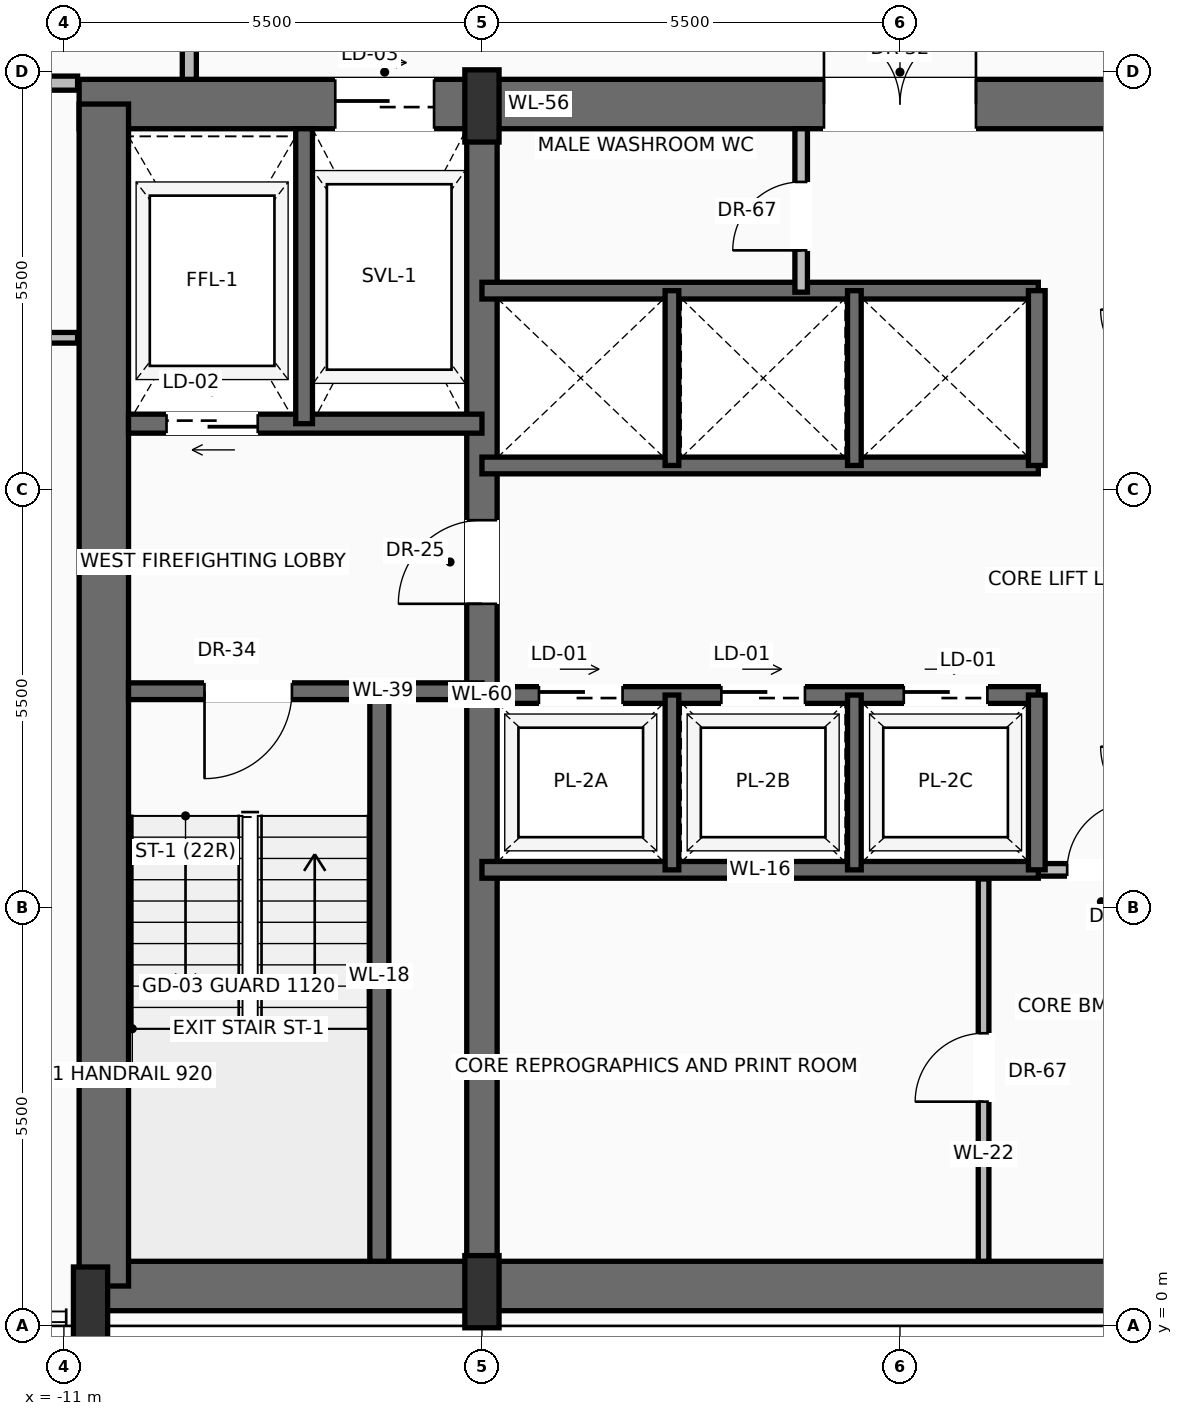
"""IFC4 building model, lengths in metres.
Left out: names, types, materials, properties, quantities, classifications, styles, units other than length and angle.
Written with IfcOpenShell. Run it as: python <this file> out.ifc"""

import sys

from ifc_helpers import new_model, si_unit, direction, frame, frame_2d, origin, origin_2d, place, context, subcontext, project, spatial, rectangle, extrude, source, transform, mapped, element, fill, save


model = new_model("IFC4")
c1 = context("Model", 3, precision=1e-05, world=origin(), true_north=direction((0.0, 1.0)))
c2 = subcontext(c1, "Body", "Model", "MODEL_VIEW")
j1 = project(units=[si_unit("LENGTHUNIT", "METRE"), si_unit("PLANEANGLEUNIT", "RADIAN")], contexts=[c1])
p1 = place(None, origin())
s1 = spatial("IfcSite", under=j1, at=p1, CompositionType="ELEMENT")
p2 = place(p1, origin())
s2 = spatial("IfcBuilding", under=s1, at=p2, CompositionType="ELEMENT")
p3 = place(p2, frame((0.0, 0.0, 162.6)))
s3 = spatial("IfcBuildingStorey", under=s2, at=p3, CompositionType="ELEMENT", Elevation=162.6)
p4 = place(p3, frame((-10.65, 0.525, 0.0), z_axis=(0.0, 0.0, 1.0), x_axis=(1.0, 0.0, 0.0)))
e1 = element("IfcWall", 1, at=p4, inside=s3, PredefinedType="SHEAR", context=c2, shape_type="SweptSolid", body=[
    extrude(rectangle(XDim=21.3, YDim=0.65, at=frame_2d((10.65, 0.0))), origin(), (0.0, 0.0, 1.0), 3.4),
])
p5 = place(p3, frame((-10.8, 16.075, 0.0), z_axis=(0.0, 0.0, 1.0), x_axis=(1.0, 0.0, 0.0)))
e2 = element("IfcWall", 2, at=p5, inside=s3, PredefinedType="SHEAR", context=c2, shape_type="SweptSolid", body=[
    extrude(rectangle(XDim=21.6, YDim=0.65, at=frame_2d((10.8, 0.0))), origin(), (0.0, 0.0, 1.0), 3.4),
])
p6 = place(p5, frame((3.37, 0.0, 0.0)))
e3 = element("IfcOpeningElement", 3, at=p6, cuts=e2, PredefinedType="OPENING", context=c2, shape_type="SweptSolid", body=[
    extrude(rectangle(XDim=1.3, YDim=2.3, at=frame_2d((0.65, 1.15))), frame((0.0, 0.335, 0.0), z_axis=(0.0, -1.0, 0.0), x_axis=(1.0, 0.0, 0.0)), (0.0, 0.0, 1.0), 0.67),
])
p7 = place(p5, frame((9.8, 0.0, 0.0)))
e4 = element("IfcOpeningElement", 4, at=p7, cuts=e2, PredefinedType="OPENING", context=c2, shape_type="SweptSolid", body=[
    extrude(rectangle(XDim=2.0, YDim=2.4, at=frame_2d((1.0, 1.2))), frame((0.0, 0.335, 0.0), z_axis=(0.0, -1.0, 0.0), x_axis=(1.0, 0.0, 0.0)), (0.0, 0.0, 1.0), 0.67),
])
p8 = place(p3, frame((-10.475, 0.525, 0.0), z_axis=(0.0, 0.0, 1.0), x_axis=(0.0, 1.0, 0.0)))
e5 = element("IfcWall", 5, at=p8, inside=s3, PredefinedType="SHEAR", context=c2, shape_type="SweptSolid", body=[
    extrude(rectangle(XDim=15.55, YDim=0.65, at=frame_2d((7.775, 0.0))), origin(), (0.0, 0.0, 1.0), 3.4),
])
p9 = place(p3, frame((-5.5, 0.525, 0.0), z_axis=(0.0, 0.0, 1.0), x_axis=(0.0, 1.0, 0.0)))
e6 = element("IfcWall", 6, at=p9, inside=s3, PredefinedType="SHEAR", context=c2, shape_type="SweptSolid", body=[
    extrude(rectangle(XDim=15.55, YDim=0.4, at=frame_2d((7.775, 0.0))), origin(), (0.0, 0.0, 1.0), 3.4),
])
p10 = place(p9, frame((8.975, 0.0, 0.0)))
e7 = element("IfcOpeningElement", 7, at=p10, cuts=e6, PredefinedType="OPENING", context=c2, shape_type="SweptSolid", body=[
    extrude(rectangle(XDim=1.1, YDim=2.2, at=frame_2d((0.55, 1.1))), frame((0.0, 0.21, 0.0), z_axis=(0.0, -1.0, 0.0), x_axis=(1.0, 0.0, 0.0)), (0.0, 0.0, 1.0), 0.42),
])
m1 = source(origin(), c2, "Body", "SweptSolid", [
    extrude(rectangle(XDim=0.45, YDim=0.95, at=origin_2d()), origin(), (0.0, 0.0, 1.0), 3.7),
])
for number, where, z_axis, x_axis in (
    (8, (-10.65, 0.3, 0.0), (0.0, 0.0, 1.0), (1.0, 0.0, 0.0)),
    (9, (-5.5, 0.45, 0.0), (0.0, 0.0, 1.0), (1.0, 0.0, 0.0)),
    (10, (-5.5, 16.05, 0.0), (0.0, 0.0, 1.0), (1.0, 0.0, 0.0)),
):
    element("IfcColumn", number, at=place(p3, frame(where, z_axis=z_axis, x_axis=x_axis)), inside=s3, PredefinedType="PILASTER", context=c2, shape_type="MappedRepresentation", body=[
        mapped(m1, transform((0.0, 0.0, 0.0), scale=1.0)),
    ])
p11 = place(p3, frame((-20.672, 16.765, 0.0), z_axis=(0.0, 0.0, 1.0), x_axis=(0.53680257422, 0.843707885651, 0.0)))
e11 = element("IfcWall", 11, at=p11, inside=s3, PredefinedType="SOLIDWALL", context=c2, shape_type="SweptSolid", body=[
    extrude(rectangle(XDim=18.632, YDim=0.28, at=frame_2d((9.316, 0.0))), origin(), (0.0, 0.0, 1.0), 2.98),
])
p12 = place(p11, frame((4.472, 0.0, 0.0)))
e12 = element("IfcOpeningElement", 12, at=p12, cuts=e11, PredefinedType="OPENING", context=c2, shape_type="SweptSolid", body=[
    extrude(rectangle(XDim=1.6, YDim=2.35, at=frame_2d((0.8, 1.175))), frame((0.0, 0.15, 0.0), z_axis=(0.0, -1.0, 0.0), x_axis=(1.0, 0.0, 0.0)), (0.0, 0.0, 1.0), 0.3),
])
p13 = place(p11, frame((12.67, 0.0, 0.9)))
e13 = element("IfcOpeningElement", 13, at=p13, cuts=e11, PredefinedType="OPENING", context=c2, shape_type="SweptSolid", body=[
    extrude(rectangle(XDim=1.55, YDim=1.85, at=frame_2d((0.775, 0.925))), frame((0.0, 0.15, 0.0), z_axis=(0.0, -1.0, 0.0), x_axis=(1.0, 0.0, 0.0)), (0.0, 0.0, 1.0), 0.3),
])
p14 = place(p3, frame((-6.85, 0.85, 0.0), z_axis=(0.0, 0.0, 1.0), x_axis=(0.0, 1.0, 0.0)))
e14 = element("IfcWall", 14, at=p14, inside=s3, PredefinedType="SOLIDWALL", context=c2, shape_type="SweptSolid", body=[
    extrude(rectangle(XDim=7.5, YDim=0.25, at=frame_2d((3.75, 0.0))), origin(), (0.0, 0.0, 1.0), 3.4),
])
p15 = place(p3, frame((-5.5, 8.35, 0.0), z_axis=(0.0, 0.0, 1.0), x_axis=(-1.0, 0.0, 0.0)))
e15 = element("IfcWall", 15, at=p15, inside=s3, PredefinedType="SOLIDWALL", context=c2, shape_type="SweptSolid", body=[
    extrude(rectangle(XDim=4.65, YDim=0.22, at=frame_2d((2.325, 0.0))), origin(), (0.0, 0.0, 1.0), 3.4),
])
p16 = place(p15, frame((2.5, 0.0, 0.0)))
e16 = element("IfcOpeningElement", 16, at=p16, cuts=e15, PredefinedType="OPENING", context=c2, shape_type="SweptSolid", body=[
    extrude(rectangle(XDim=1.15, YDim=2.2, at=frame_2d((0.575, 1.1))), frame((0.0, 0.12, 0.0), z_axis=(0.0, -1.0, 0.0), x_axis=(1.0, 0.0, 0.0)), (0.0, 0.0, 1.0), 0.24),
])
p17 = place(p3, frame((-5.5, 11.87, 0.0), z_axis=(0.0, 0.0, 1.0), x_axis=(-1.0, 0.0, 0.0)))
e17 = element("IfcWall", 17, at=p17, inside=s3, PredefinedType="SOLIDWALL", context=c2, shape_type="SweptSolid", body=[
    extrude(rectangle(XDim=4.65, YDim=0.25, at=frame_2d((2.325, 0.0))), origin(), (0.0, 0.0, 1.0), 3.4),
])
p18 = place(p17, frame((2.95, 0.0, 0.0)))
e18 = element("IfcOpeningElement", 18, at=p18, cuts=e17, PredefinedType="OPENING", context=c2, shape_type="SweptSolid", body=[
    extrude(rectangle(XDim=1.2, YDim=2.25, at=frame_2d((0.6, 1.125))), frame((0.0, 0.135, 0.0), z_axis=(0.0, -1.0, 0.0), x_axis=(1.0, 0.0, 0.0)), (0.0, 0.0, 1.0), 0.27),
])
p19 = place(p3, frame((-7.84, 11.87, 0.0), z_axis=(0.0, 0.0, 1.0), x_axis=(0.0, 1.0, 0.0)))
e19 = element("IfcWall", 19, at=p19, inside=s3, PredefinedType="SOLIDWALL", context=c2, shape_type="SweptSolid", body=[
    extrude(rectangle(XDim=3.88, YDim=0.22, at=frame_2d((1.94, 0.0))), origin(), (0.0, 0.0, 1.0), 3.4),
])
p20 = place(p3, frame((1.82, 6.0, 0.0), z_axis=(0.0, 0.0, 1.0), x_axis=(1.0, 0.0, 0.0)))
e20 = element("IfcWall", 20, at=p20, inside=s3, PredefinedType="PARTITIONING", context=c2, shape_type="SweptSolid", body=[
    extrude(rectangle(XDim=3.48, YDim=0.165, at=frame_2d((1.74, 0.0))), origin(), (0.0, 0.0, 1.0), 3.392),
])
p21 = place(p20, frame((0.38, 0.0, 0.0)))
e21 = element("IfcOpeningElement", 21, at=p21, cuts=e20, PredefinedType="OPENING", context=c2, shape_type="SweptSolid", body=[
    extrude(rectangle(XDim=0.9, YDim=2.1, at=frame_2d((0.45, 1.05))), frame((0.0, 0.093, 0.0), z_axis=(0.0, -1.0, 0.0), x_axis=(1.0, 0.0, 0.0)), (0.0, 0.0, 1.0), 0.185),
])
p22 = place(p3, frame((1.1, 0.85, 0.0), z_axis=(0.0, 0.0, 1.0), x_axis=(0.0, 1.0, 0.0)))
e22 = element("IfcWall", 22, at=p22, inside=s3, PredefinedType="PARTITIONING", context=c2, shape_type="SweptSolid", body=[
    extrude(rectangle(XDim=5.03, YDim=0.14, at=frame_2d((2.515, 0.0))), origin(), (0.0, 0.0, 1.0), 3.392),
])
p23 = place(p22, frame((2.1, 0.0, 0.0)))
e23 = element("IfcOpeningElement", 23, at=p23, cuts=e22, PredefinedType="OPENING", context=c2, shape_type="SweptSolid", body=[
    extrude(rectangle(XDim=0.9, YDim=2.1, at=frame_2d((0.45, 1.05))), frame((0.0, 0.08, 0.0), z_axis=(0.0, -1.0, 0.0), x_axis=(1.0, 0.0, 0.0)), (0.0, 0.0, 1.0), 0.16),
])
p24 = place(p3, frame((-5.5, 6.0, 0.0), z_axis=(0.0, 0.0, 1.0), x_axis=(1.0, 0.0, 0.0)))
e24 = element("IfcWall", 24, at=p24, inside=s3, PredefinedType="SOLIDWALL", context=c2, shape_type="SweptSolid", body=[
    extrude(rectangle(XDim=7.32, YDim=0.22, at=frame_2d((3.66, 0.0))), origin(), (0.0, 0.0, 1.0), 3.4),
])
p25 = place(p3, frame((-5.5, 8.3, 0.0), z_axis=(0.0, 0.0, 1.0), x_axis=(1.0, 0.0, 0.0)))
e25 = element("IfcWall", 25, at=p25, inside=s3, PredefinedType="SOLIDWALL", context=c2, shape_type="SweptSolid", body=[
    extrude(rectangle(XDim=7.32, YDim=0.22, at=frame_2d((3.66, 0.0))), origin(), (0.0, 0.0, 1.0), 3.4),
])
p26 = place(p25, frame((0.75, 0.0, 0.0)))
e26 = element("IfcOpeningElement", 26, at=p26, cuts=e25, PredefinedType="OPENING", context=c2, shape_type="SweptSolid", body=[
    extrude(rectangle(XDim=1.1, YDim=2.2, at=frame_2d((0.55, 1.1))), frame((0.0, 0.12, 0.0), z_axis=(0.0, -1.0, 0.0), x_axis=(1.0, 0.0, 0.0)), (0.0, 0.0, 1.0), 0.24),
])
p27 = place(p25, frame((3.15, 0.0, 0.0)))
e27 = element("IfcOpeningElement", 27, at=p27, cuts=e25, PredefinedType="OPENING", context=c2, shape_type="SweptSolid", body=[
    extrude(rectangle(XDim=1.1, YDim=2.2, at=frame_2d((0.55, 1.1))), frame((0.0, 0.12, 0.0), z_axis=(0.0, -1.0, 0.0), x_axis=(1.0, 0.0, 0.0)), (0.0, 0.0, 1.0), 0.24),
])
p28 = place(p25, frame((5.55, 0.0, 0.0)))
e28 = element("IfcOpeningElement", 28, at=p28, cuts=e25, PredefinedType="OPENING", context=c2, shape_type="SweptSolid", body=[
    extrude(rectangle(XDim=1.1, YDim=2.2, at=frame_2d((0.55, 1.1))), frame((0.0, 0.12, 0.0), z_axis=(0.0, -1.0, 0.0), x_axis=(1.0, 0.0, 0.0)), (0.0, 0.0, 1.0), 0.24),
])
p29 = place(p3, frame((1.8, 6.0, 0.0), z_axis=(0.0, 0.0, 1.0), x_axis=(0.0, 1.0, 0.0)))
e29 = element("IfcWall", 29, at=p29, inside=s3, PredefinedType="SOLIDWALL", context=c2, shape_type="SweptSolid", body=[
    extrude(rectangle(XDim=2.3, YDim=0.22, at=frame_2d((1.15, 0.0))), origin(), (0.0, 0.0, 1.0), 3.4),
])
for number, where, z_axis, x_axis in (
    (30, (-3.0, 6.0, 0.0), (0.0, 0.0, 1.0), (0.0, 1.0, 0.0)),
    (31, (-0.6, 6.0, 0.0), (0.0, 0.0, 1.0), (0.0, 1.0, 0.0)),
):
    element("IfcWall", number, at=place(p3, frame(where, z_axis=z_axis, x_axis=x_axis)), inside=s3, PredefinedType="SOLIDWALL", context=c2, shape_type="SweptSolid", body=[
        extrude(rectangle(XDim=2.3, YDim=0.18, at=frame_2d((1.15, 0.0))), origin(), (0.0, 0.0, 1.0), 3.4),
    ])
for number, where, z_axis, x_axis in (
    (32, (-5.5, 11.32, 0.0), (0.0, 0.0, 1.0), (1.0, 0.0, 0.0)),
    (33, (-5.5, 13.62, 0.0), (0.0, 0.0, 1.0), (1.0, 0.0, 0.0)),
):
    element("IfcWall", number, at=place(p3, frame(where, z_axis=z_axis, x_axis=x_axis)), inside=s3, PredefinedType="SOLIDWALL", context=c2, shape_type="SweptSolid", body=[
        extrude(rectangle(XDim=7.32, YDim=0.22, at=frame_2d((3.66, 0.0))), origin(), (0.0, 0.0, 1.0), 3.4),
    ])
p30 = place(p3, frame((1.8, 11.32, 0.0), z_axis=(0.0, 0.0, 1.0), x_axis=(0.0, 1.0, 0.0)))
e34 = element("IfcWall", 34, at=p30, inside=s3, PredefinedType="SOLIDWALL", context=c2, shape_type="SweptSolid", body=[
    extrude(rectangle(XDim=2.3, YDim=0.22, at=frame_2d((1.15, 0.0))), origin(), (0.0, 0.0, 1.0), 3.4),
])
for number, where, z_axis, x_axis in (
    (35, (-3.0, 11.32, 0.0), (0.0, 0.0, 1.0), (0.0, 1.0, 0.0)),
    (36, (-0.6, 11.32, 0.0), (0.0, 0.0, 1.0), (0.0, 1.0, 0.0)),
):
    element("IfcWall", number, at=place(p3, frame(where, z_axis=z_axis, x_axis=x_axis)), inside=s3, PredefinedType="SOLIDWALL", context=c2, shape_type="SweptSolid", body=[
        extrude(rectangle(XDim=2.3, YDim=0.18, at=frame_2d((1.15, 0.0))), origin(), (0.0, 0.0, 1.0), 3.4),
    ])
p31 = place(p3, frame((-1.3, 13.6, 0.0), z_axis=(0.0, 0.0, 1.0), x_axis=(0.0, 1.0, 0.0)))
e37 = element("IfcWall", 37, at=p31, inside=s3, PredefinedType="PARTITIONING", context=c2, shape_type="SweptSolid", body=[
    extrude(rectangle(XDim=2.15, YDim=0.165, at=frame_2d((1.075, 0.0))), origin(), (0.0, 0.0, 1.0), 3.392),
])
p32 = place(p31, frame((0.55, 0.0, 0.0)))
e38 = element("IfcOpeningElement", 38, at=p32, cuts=e37, PredefinedType="OPENING", context=c2, shape_type="SweptSolid", body=[
    extrude(rectangle(XDim=0.9, YDim=2.1, at=frame_2d((0.45, 1.05))), frame((0.0, 0.093, 0.0), z_axis=(0.0, -1.0, 0.0), x_axis=(1.0, 0.0, 0.0)), (0.0, 0.0, 1.0), 0.185),
])
p33 = place(p3, frame((-9.35, 16.4, 0.0), z_axis=(0.0, 0.0, 1.0), x_axis=(0.0, 1.0, 0.0)))
e39 = element("IfcWall", 39, at=p33, inside=s3, PredefinedType="PARTITIONING", context=c2, shape_type="SweptSolid", body=[
    extrude(rectangle(XDim=7.8, YDim=0.185, at=frame_2d((3.9, 0.0))), origin(), (0.0, 0.0, 1.0), 3.392),
])
p34 = place(p33, frame((3.069, 0.0, 0.0)))
e40 = element("IfcOpeningElement", 40, at=p34, cuts=e39, PredefinedType="OPENING", context=c2, shape_type="SweptSolid", body=[
    extrude(rectangle(XDim=0.95, YDim=2.2, at=frame_2d((0.475, 1.1))), frame((0.0, 0.103, 0.0), z_axis=(0.0, -1.0, 0.0), x_axis=(1.0, 0.0, 0.0)), (0.0, 0.0, 1.0), 0.205),
])
p35 = place(p3, frame((-21.09, 16.35, 0.0), z_axis=(0.0, 0.0, 1.0), x_axis=(1.0, 0.0, 0.0)))
e41 = element("IfcWall", 41, at=p35, inside=s3, PredefinedType="PARTITIONING", context=c2, shape_type="SweptSolid", body=[
    extrude(rectangle(XDim=10.27, YDim=0.185, at=frame_2d((5.135, 0.0))), origin(), (0.0, 0.0, 1.0), 3.392),
])
p36 = place(p35, frame((6.098, 0.0, 0.0)))
e42 = element("IfcOpeningElement", 42, at=p36, cuts=e41, PredefinedType="OPENING", context=c2, shape_type="SweptSolid", body=[
    extrude(rectangle(XDim=0.95, YDim=2.2, at=frame_2d((0.475, 1.1))), frame((0.0, 0.103, 0.0), z_axis=(0.0, -1.0, 0.0), x_axis=(1.0, 0.0, 0.0)), (0.0, 0.0, 1.0), 0.205),
])
p37 = place(p3, frame((-23.221, 13.0, 0.0), z_axis=(0.0, 0.0, 1.0), x_axis=(1.0, 0.0, 0.0)))
e43 = element("IfcWall", 43, at=p37, inside=s3, PredefinedType="PARTITIONING", context=c2, shape_type="SweptSolid", body=[
    extrude(rectangle(XDim=12.401, YDim=0.14, at=frame_2d((6.201, 0.0))), origin(), (0.0, 0.0, 1.0), 3.392),
])
p38 = place(p37, frame((5.733, 0.0, 0.0)))
e44 = element("IfcOpeningElement", 44, at=p38, cuts=e43, PredefinedType="OPENING", context=c2, shape_type="SweptSolid", body=[
    extrude(rectangle(XDim=0.95, YDim=2.2, at=frame_2d((0.475, 1.1))), frame((0.0, 0.08, 0.0), z_axis=(0.0, -1.0, 0.0), x_axis=(1.0, 0.0, 0.0)), (0.0, 0.0, 1.0), 0.16),
])
m2 = source(origin(), c2, "Body", "SweptSolid", [
    extrude(rectangle(XDim=1.15, YDim=2.2, at=frame_2d((0.575, 1.1))), frame((0.0, 0.025, 0.0), z_axis=(0.0, -1.0, 0.0), x_axis=(1.0, 0.0, 0.0)), (0.0, 0.0, 1.0), 0.05),
])
p39 = place(p16, origin())
e45 = element("IfcDoor", 45, at=p39, inside=s3, OperationType="SINGLE_SWING_RIGHT", PredefinedType="DOOR", context=c2, shape_type="MappedRepresentation", body=[
    mapped(m2, transform((0.0, 0.0, 0.0), scale=1.0)),
])
fill(e16, e45)
m3 = source(origin(), c2, "Body", "SweptSolid", [
    extrude(rectangle(XDim=1.1, YDim=2.2, at=frame_2d((0.55, 1.1))), frame((0.0, 0.025, 0.0), z_axis=(0.0, -1.0, 0.0), x_axis=(1.0, 0.0, 0.0)), (0.0, 0.0, 1.0), 0.05),
])
p40 = place(p10, origin())
e46 = element("IfcDoor", 46, at=p40, inside=s3, OperationType="SINGLE_SWING_LEFT", PredefinedType="DOOR", context=c2, shape_type="MappedRepresentation", body=[
    mapped(m3, transform((0.0, 0.0, 0.0), scale=1.0)),
])
fill(e7, e46)
m4 = source(origin(), c2, "Body", "SweptSolid", [
    extrude(rectangle(XDim=1.2, YDim=2.25, at=frame_2d((0.6, 1.125))), frame((0.0, 0.025, 0.0), z_axis=(0.0, -1.0, 0.0), x_axis=(1.0, 0.0, 0.0)), (0.0, 0.0, 1.0), 0.05),
])
p41 = place(p18, origin())
e47 = element("IfcDoor", 47, at=p41, inside=s3, OperationType="SLIDING_TO_LEFT", PredefinedType="DOOR", context=c2, shape_type="MappedRepresentation", body=[
    mapped(m4, transform((0.0, 0.0, 0.0), scale=1.0)),
])
fill(e18, e47)
m5 = source(origin(), c2, "Body", "SweptSolid", [
    extrude(rectangle(XDim=1.3, YDim=2.3, at=frame_2d((0.65, 1.15))), frame((0.0, 0.025, 0.0), z_axis=(0.0, -1.0, 0.0), x_axis=(1.0, 0.0, 0.0)), (0.0, 0.0, 1.0), 0.05),
])
p42 = place(p6, origin())
e48 = element("IfcDoor", 48, at=p42, inside=s3, OperationType="SLIDING_TO_RIGHT", PredefinedType="DOOR", context=c2, shape_type="MappedRepresentation", body=[
    mapped(m5, transform((0.0, 0.0, 0.0), scale=1.0)),
])
fill(e3, e48)
m6 = source(origin(), c2, "Body", "SweptSolid", [
    extrude(rectangle(XDim=2.0, YDim=2.4, at=frame_2d((1.0, 1.2))), frame((0.0, 0.025, 0.0), z_axis=(0.0, -1.0, 0.0), x_axis=(1.0, 0.0, 0.0)), (0.0, 0.0, 1.0), 0.05),
])
p43 = place(p7, origin())
e49 = element("IfcDoor", 49, at=p43, inside=s3, OperationType="DOUBLE_DOOR_SINGLE_SWING", PredefinedType="DOOR", context=c2, shape_type="MappedRepresentation", body=[
    mapped(m6, transform((0.0, 0.0, 0.0), scale=1.0)),
])
fill(e4, e49)
m7 = source(origin(), c2, "Body", "SweptSolid", [
    extrude(rectangle(XDim=0.9, YDim=2.1, at=frame_2d((0.45, 1.05))), frame((0.0, 0.025, 0.0), z_axis=(0.0, -1.0, 0.0), x_axis=(1.0, 0.0, 0.0)), (0.0, 0.0, 1.0), 0.05),
])
p44 = place(p21, origin())
e50 = element("IfcDoor", 50, at=p44, inside=s3, OperationType="SINGLE_SWING_RIGHT", PredefinedType="DOOR", context=c2, shape_type="MappedRepresentation", body=[
    mapped(m7, transform((0.0, 0.0, 0.0), scale=1.0)),
])
fill(e21, e50)
p45 = place(p23, origin())
e51 = element("IfcDoor", 51, at=p45, inside=s3, OperationType="SINGLE_SWING_LEFT", PredefinedType="DOOR", context=c2, shape_type="MappedRepresentation", body=[
    mapped(m7, transform((0.0, 0.0, 0.0), scale=1.0)),
])
fill(e23, e51)
m8 = source(origin(), c2, "Body", "SweptSolid", [
    extrude(rectangle(XDim=1.1, YDim=2.2, at=frame_2d((0.55, 1.1))), frame((0.0, 0.025, 0.0), z_axis=(0.0, -1.0, 0.0), x_axis=(1.0, 0.0, 0.0)), (0.0, 0.0, 1.0), 0.05),
])
p46 = place(p26, origin())
e52 = element("IfcDoor", 52, at=p46, inside=s3, OperationType="SLIDING_TO_LEFT", PredefinedType="DOOR", context=c2, shape_type="MappedRepresentation", body=[
    mapped(m8, transform((0.0, 0.0, 0.0), scale=1.0)),
])
fill(e26, e52)
p47 = place(p27, origin())
e53 = element("IfcDoor", 53, at=p47, inside=s3, OperationType="SLIDING_TO_LEFT", PredefinedType="DOOR", context=c2, shape_type="MappedRepresentation", body=[
    mapped(m8, transform((0.0, 0.0, 0.0), scale=1.0)),
])
fill(e27, e53)
p48 = place(p28, origin())
e54 = element("IfcDoor", 54, at=p48, inside=s3, OperationType="SLIDING_TO_LEFT", PredefinedType="DOOR", context=c2, shape_type="MappedRepresentation", body=[
    mapped(m8, transform((0.0, 0.0, 0.0), scale=1.0)),
])
fill(e28, e54)
p49 = place(p32, origin())
e55 = element("IfcDoor", 55, at=p49, inside=s3, OperationType="SINGLE_SWING_LEFT", PredefinedType="DOOR", context=c2, shape_type="MappedRepresentation", body=[
    mapped(m7, transform((0.0, 0.0, 0.0), scale=1.0)),
])
fill(e38, e55)
save(model, sys.argv[1])
